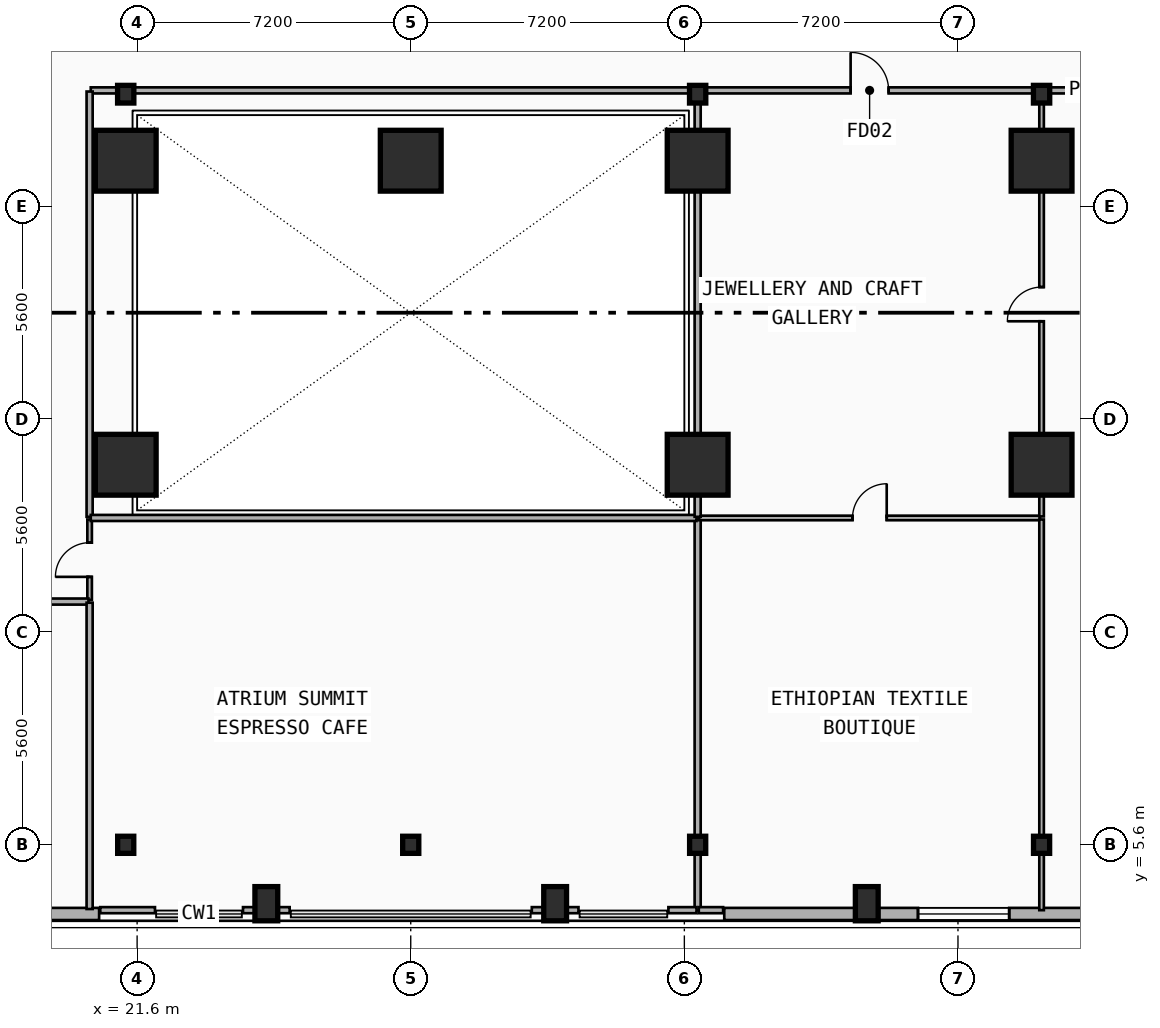
"""IFC4 building model, lengths in metres.
Left out: names, types, materials, properties, quantities, classifications, styles, units other than length and angle.
Written with IfcOpenShell. Run it as: python <this file> out.ifc"""

import sys

from ifc_helpers import new_model, si_unit, direction, frame, frame_2d, origin, origin_2d, place, context, subcontext, project, spatial, rectangle, i_section, extrude, element, fill, save


model = new_model("IFC4")
c1 = context("Model", 3, precision=1e-05, world=origin(), true_north=direction((0.0, 1.0)))
c2 = subcontext(c1, "Body", "Model", "MODEL_VIEW")
j1 = project(units=[si_unit("LENGTHUNIT", "METRE"), si_unit("PLANEANGLEUNIT", "RADIAN")], contexts=[c1])
p1 = place(None, origin())
s1 = spatial("IfcSite", under=j1, at=p1, CompositionType="ELEMENT")
p2 = place(p1, origin())
s2 = spatial("IfcBuilding", under=s1, at=p2, CompositionType="ELEMENT")
p3 = place(p2, frame((0.0, 0.0, 5.4)))
s3 = spatial("IfcBuildingStorey", under=s2, at=p3, CompositionType="ELEMENT", Elevation=5.4)
for number, where, z_axis, x_axis in (
    (1, (21.3, 25.35, 0.0), (0.0, 0.0, 1.0), (1.0, 0.0, 0.0)),
    (2, (36.35, 25.35, 0.0), (0.0, 0.0, 1.0), (1.0, 0.0, 0.0)),
    (3, (45.4, 25.35, 0.0), (0.0, 0.0, 1.0), (1.0, 0.0, 0.0)),
):
    element("IfcColumn", number, at=place(p3, frame(where, z_axis=z_axis, x_axis=x_axis)), inside=s3, PredefinedType="COLUMN", context=c2, shape_type="SweptSolid", body=[
        extrude(i_section(OverallWidth=0.428, OverallDepth=0.465, WebThickness=0.045, FlangeThickness=0.073, FilletRadius=0.015, at=origin_2d()), origin(), (0.0, 0.0, 1.0), 5.0),
    ])
p4 = place(p3, frame((21.3, 5.6, 0.0), z_axis=(0.0, 0.0, 1.0), x_axis=(1.0, 0.0, 0.0)))
e4 = element("IfcColumn", 4, at=p4, inside=s3, PredefinedType="COLUMN", context=c2, shape_type="SweptSolid", body=[
    extrude(i_section(OverallWidth=0.424, OverallDepth=0.45, WebThickness=0.041, FlangeThickness=0.065, FilletRadius=0.015, at=origin_2d()), origin(), (0.0, 0.0, 1.0), 5.0),
])
for number, where, z_axis, x_axis in (
    (5, (21.3, 15.6, 0.0), (0.0, 0.0, 1.0), (1.0, 0.0, 0.0)),
    (6, (21.3, 23.6, 0.0), (0.0, 0.0, 1.0), (1.0, 0.0, 0.0)),
):
    element("IfcColumn", number, at=place(p3, frame(where, z_axis=z_axis, x_axis=x_axis)), inside=s3, PredefinedType="COLUMN", context=c2, shape_type="SweptSolid", body=[
        extrude(rectangle(XDim=1.6, YDim=1.6, at=origin_2d()), origin(), (0.0, 0.0, 1.0), 5.0),
    ])
p5 = place(p3, frame((28.8, 5.6, 0.0), z_axis=(0.0, 0.0, 1.0), x_axis=(1.0, 0.0, 0.0)))
e7 = element("IfcColumn", 7, at=p5, inside=s3, PredefinedType="COLUMN", context=c2, shape_type="SweptSolid", body=[
    extrude(i_section(OverallWidth=0.424, OverallDepth=0.45, WebThickness=0.041, FlangeThickness=0.065, FilletRadius=0.015, at=origin_2d()), origin(), (0.0, 0.0, 1.0), 5.0),
])
p6 = place(p3, frame((28.8, 23.6, 0.0), z_axis=(0.0, 0.0, 1.0), x_axis=(1.0, 0.0, 0.0)))
e8 = element("IfcColumn", 8, at=p6, inside=s3, PredefinedType="COLUMN", context=c2, shape_type="SweptSolid", body=[
    extrude(rectangle(XDim=1.6, YDim=1.6, at=origin_2d()), origin(), (0.0, 0.0, 1.0), 5.0),
])
p7 = place(p3, frame((36.35, 5.6, 0.0), z_axis=(0.0, 0.0, 1.0), x_axis=(1.0, 0.0, 0.0)))
e9 = element("IfcColumn", 9, at=p7, inside=s3, PredefinedType="COLUMN", context=c2, shape_type="SweptSolid", body=[
    extrude(i_section(OverallWidth=0.424, OverallDepth=0.45, WebThickness=0.041, FlangeThickness=0.065, FilletRadius=0.015, at=origin_2d()), origin(), (0.0, 0.0, 1.0), 5.0),
])
for number, where, z_axis, x_axis in (
    (10, (36.35, 15.6, 0.0), (0.0, 0.0, 1.0), (1.0, 0.0, 0.0)),
    (11, (36.35, 23.6, 0.0), (0.0, 0.0, 1.0), (1.0, 0.0, 0.0)),
):
    element("IfcColumn", number, at=place(p3, frame(where, z_axis=z_axis, x_axis=x_axis)), inside=s3, PredefinedType="COLUMN", context=c2, shape_type="SweptSolid", body=[
        extrude(rectangle(XDim=1.6, YDim=1.6, at=origin_2d()), origin(), (0.0, 0.0, 1.0), 5.0),
    ])
p8 = place(p3, frame((45.4, 5.6, 0.0), z_axis=(0.0, 0.0, 1.0), x_axis=(1.0, 0.0, 0.0)))
e12 = element("IfcColumn", 12, at=p8, inside=s3, PredefinedType="COLUMN", context=c2, shape_type="SweptSolid", body=[
    extrude(i_section(OverallWidth=0.424, OverallDepth=0.45, WebThickness=0.041, FlangeThickness=0.065, FilletRadius=0.015, at=origin_2d()), origin(), (0.0, 0.0, 1.0), 5.0),
])
for number, where, z_axis, x_axis in (
    (13, (45.4, 15.6, 0.0), (0.0, 0.0, 1.0), (1.0, 0.0, 0.0)),
    (14, (45.4, 23.6, 0.0), (0.0, 0.0, 1.0), (1.0, 0.0, 0.0)),
):
    element("IfcColumn", number, at=place(p3, frame(where, z_axis=z_axis, x_axis=x_axis)), inside=s3, PredefinedType="COLUMN", context=c2, shape_type="SweptSolid", body=[
        extrude(rectangle(XDim=1.6, YDim=1.6, at=origin_2d()), origin(), (0.0, 0.0, 1.0), 5.0),
    ])
for number, where, z_axis, x_axis in (
    (15, (25.0, 4.05, 0.0), (0.0, 0.0, 1.0), (1.0, 0.0, 0.0)),
    (16, (32.6, 4.05, 0.0), (0.0, 0.0, 1.0), (1.0, 0.0, 0.0)),
    (17, (40.8, 4.05, 0.0), (0.0, 0.0, 1.0), (1.0, 0.0, 0.0)),
):
    element("IfcColumn", number, at=place(p3, frame(where, z_axis=z_axis, x_axis=x_axis)), inside=s3, PredefinedType="PILASTER", context=c2, shape_type="SweptSolid", body=[
        extrude(rectangle(XDim=0.6, YDim=0.9, at=origin_2d()), origin(), (0.0, 0.0, 1.0), 5.0),
    ])
p9 = place(p3, frame((20.6, 3.78, 0.0), z_axis=(0.0, 0.0, 1.0), x_axis=(-1.0, 0.0, 0.0)))
e18 = element("IfcWall", 18, at=p9, inside=s3, PredefinedType="SOLIDWALL", context=c2, shape_type="SweptSolid", body=[
    extrude(rectangle(XDim=17.0, YDim=0.32, at=frame_2d((8.5, 0.0))), origin(), (0.0, 0.0, 1.0), 4.03),
])
p10 = place(p9, frame((6.5, 0.0, 0.9)))
e19 = element("IfcOpeningElement", 19, at=p10, cuts=e18, PredefinedType="OPENING", context=c2, shape_type="SweptSolid", body=[
    extrude(rectangle(XDim=2.4, YDim=1.8, at=frame_2d((1.2, 0.9))), frame((0.0, 0.17, 0.0), z_axis=(0.0, -1.0, 0.0), x_axis=(1.0, 0.0, 0.0)), (0.0, 0.0, 1.0), 0.34),
])
p11 = place(p3, frame((54.0, 3.78, 0.0), z_axis=(0.0, 0.0, 1.0), x_axis=(-1.0, 0.0, 0.0)))
e20 = element("IfcWall", 20, at=p11, inside=s3, PredefinedType="SOLIDWALL", context=c2, shape_type="SweptSolid", body=[
    extrude(rectangle(XDim=16.95, YDim=0.32, at=frame_2d((8.475, 0.0))), origin(), (0.0, 0.0, 1.0), 4.03),
])
p12 = place(p11, frame((9.452, 0.0, 0.9)))
e21 = element("IfcOpeningElement", 21, at=p12, cuts=e20, PredefinedType="OPENING", context=c2, shape_type="SweptSolid", body=[
    extrude(rectangle(XDim=2.4, YDim=1.8, at=frame_2d((1.2, 0.9))), frame((0.0, 0.17, 0.0), z_axis=(0.0, -1.0, 0.0), x_axis=(1.0, 0.0, 0.0)), (0.0, 0.0, 1.0), 0.34),
])
p13 = place(p11, frame((1.262, 0.0, 0.9)))
e22 = element("IfcOpeningElement", 22, at=p13, cuts=e20, PredefinedType="OPENING", context=c2, shape_type="SweptSolid", body=[
    extrude(rectangle(XDim=2.4, YDim=1.8, at=frame_2d((1.2, 0.9))), frame((0.0, 0.17, 0.0), z_axis=(0.0, -1.0, 0.0), x_axis=(1.0, 0.0, 0.0)), (0.0, 0.0, 1.0), 0.34),
])
p14 = place(p3, frame((36.39, 25.45, 0.0), z_axis=(0.0, 0.0, 1.0), x_axis=(1.0, 0.0, 0.0)))
e23 = element("IfcWall", 23, at=p14, inside=s3, PredefinedType="PARTITIONING", context=c2, shape_type="SweptSolid", body=[
    extrude(rectangle(XDim=8.97, YDim=0.16, at=frame_2d((4.485, 0.0))), origin(), (0.0, 0.0, 1.0), 3.672),
])
p15 = place(p14, frame((3.985, 0.0, 0.0)))
e24 = element("IfcOpeningElement", 24, at=p15, cuts=e23, PredefinedType="OPENING", context=c2, shape_type="SweptSolid", body=[
    extrude(rectangle(XDim=1.0, YDim=2.15, at=frame_2d((0.5, 1.075))), frame((0.0, 0.09, 0.0), z_axis=(0.0, -1.0, 0.0), x_axis=(1.0, 0.0, 0.0)), (0.0, 0.0, 1.0), 0.18),
])
p16 = place(p3, frame((45.44, 25.45, 0.0), z_axis=(0.0, 0.0, 1.0), x_axis=(1.0, 0.0, 0.0)))
e25 = element("IfcWall", 25, at=p16, inside=s3, PredefinedType="PARTITIONING", context=c2, shape_type="SweptSolid", body=[
    extrude(rectangle(XDim=2.57, YDim=0.16, at=frame_2d((1.285, 0.0))), origin(), (0.0, 0.0, 1.0), 3.672),
])
p17 = place(p3, frame((20.35, 12.04, 0.0), z_axis=(0.0, 0.0, 1.0), x_axis=(0.0, 1.0, 0.0)))
e26 = element("IfcWall", 26, at=p17, inside=s3, PredefinedType="PARTITIONING", context=c2, shape_type="SweptSolid", body=[
    extrude(rectangle(XDim=2.12, YDim=0.12, at=frame_2d((1.06, 0.0))), origin(), (0.0, 0.0, 1.0), 4.32),
])
p18 = place(p17, frame((0.61, 0.0, 0.0)))
e27 = element("IfcOpeningElement", 27, at=p18, cuts=e26, PredefinedType="OPENING", context=c2, shape_type="SweptSolid", body=[
    extrude(rectangle(XDim=0.9, YDim=2.1, at=frame_2d((0.45, 1.05))), frame((0.0, 0.07, 0.0), z_axis=(0.0, -1.0, 0.0), x_axis=(1.0, 0.0, 0.0)), (0.0, 0.0, 1.0), 0.14),
])
p19 = place(p3, frame((36.35, 3.88, 0.0), z_axis=(0.0, 0.0, 1.0), x_axis=(0.0, 1.0, 0.0)))
e28 = element("IfcWall", 28, at=p19, inside=s3, PredefinedType="PARTITIONING", context=c2, shape_type="SweptSolid", body=[
    extrude(rectangle(XDim=10.28, YDim=0.16, at=frame_2d((5.14, 0.0))), origin(), (0.0, 0.0, 1.0), 3.672),
])
p20 = place(p3, frame((36.39, 14.2, 0.0), z_axis=(0.0, 0.0, 1.0), x_axis=(1.0, 0.0, 0.0)))
e29 = element("IfcWall", 29, at=p20, inside=s3, PredefinedType="PARTITIONING", context=c2, shape_type="SweptSolid", body=[
    extrude(rectangle(XDim=8.97, YDim=0.12, at=frame_2d((4.485, 0.0))), origin(), (0.0, 0.0, 1.0), 3.672),
])
p21 = place(p20, frame((4.035, 0.0, 0.0)))
e30 = element("IfcOpeningElement", 30, at=p21, cuts=e29, PredefinedType="OPENING", context=c2, shape_type="SweptSolid", body=[
    extrude(rectangle(XDim=0.9, YDim=2.1, at=frame_2d((0.45, 1.05))), frame((0.0, 0.07, 0.0), z_axis=(0.0, -1.0, 0.0), x_axis=(1.0, 0.0, 0.0)), (0.0, 0.0, 1.0), 0.14),
])
p22 = place(p3, frame((45.4, 3.88, 0.0), z_axis=(0.0, 0.0, 1.0), x_axis=(0.0, 1.0, 0.0)))
e31 = element("IfcWall", 31, at=p22, inside=s3, PredefinedType="PARTITIONING", context=c2, shape_type="SweptSolid", body=[
    extrude(rectangle(XDim=10.28, YDim=0.12, at=frame_2d((5.14, 0.0))), origin(), (0.0, 0.0, 1.0), 3.672),
])
p23 = place(p3, frame((45.4, 14.24, 0.0), z_axis=(0.0, 0.0, 1.0), x_axis=(0.0, 1.0, 0.0)))
e32 = element("IfcWall", 32, at=p23, inside=s3, PredefinedType="PARTITIONING", context=c2, shape_type="SweptSolid", body=[
    extrude(rectangle(XDim=11.17, YDim=0.12, at=frame_2d((5.585, 0.0))), origin(), (0.0, 0.0, 1.0), 3.672),
])
p24 = place(p23, frame((5.135, 0.0, 0.0)))
e33 = element("IfcOpeningElement", 33, at=p24, cuts=e32, PredefinedType="OPENING", context=c2, shape_type="SweptSolid", body=[
    extrude(rectangle(XDim=0.9, YDim=2.1, at=frame_2d((0.45, 1.05))), frame((0.0, 0.07, 0.0), z_axis=(0.0, -1.0, 0.0), x_axis=(1.0, 0.0, 0.0)), (0.0, 0.0, 1.0), 0.14),
])
p25 = place(p3, frame((20.38, 25.45, 0.0), z_axis=(0.0, 0.0, 1.0), x_axis=(1.0, 0.0, 0.0)))
e34 = element("IfcWall", 34, at=p25, inside=s3, PredefinedType="PARTITIONING", context=c2, shape_type="SweptSolid", body=[
    extrude(rectangle(XDim=15.94, YDim=0.16, at=frame_2d((7.97, 0.0))), origin(), (0.0, 0.0, 1.0), 3.672),
])
p26 = place(p3, frame((18.83, 12.0, 0.0), z_axis=(0.0, 0.0, 1.0), x_axis=(1.0, 0.0, 0.0)))
e35 = element("IfcWall", 35, at=p26, inside=s3, PredefinedType="PARTITIONING", context=c2, shape_type="SweptSolid", body=[
    extrude(rectangle(XDim=1.49, YDim=0.16, at=frame_2d((0.745, 0.0))), origin(), (0.0, 0.0, 1.0), 4.32),
])
p27 = place(p3, frame((20.35, 14.23, 0.0), z_axis=(0.0, 0.0, 1.0), x_axis=(0.0, 1.0, 0.0)))
e36 = element("IfcWall", 36, at=p27, inside=s3, PredefinedType="PARTITIONING", context=c2, shape_type="SweptSolid", body=[
    extrude(rectangle(XDim=11.19, YDim=0.16, at=frame_2d((5.595, 0.0))), origin(), (0.0, 0.0, 1.0), 3.672),
])
p28 = place(p3, frame((20.63, 3.88, 0.0), z_axis=(0.0, 0.0, 1.0), x_axis=(1.0, 0.0, 0.0)))
e37 = element("IfcWall", 37, at=p28, inside=s3, PredefinedType="PARTITIONING", context=c2, shape_type="SweptSolid", body=[
    extrude(rectangle(XDim=1.44, YDim=0.16, at=frame_2d((0.72, 0.0))), origin(), (0.0, 0.0, 1.0), 4.03),
])
for number, where, z_axis, x_axis in (
    (38, (24.386, 3.88, 0.0), (0.0, 0.0, 1.0), (1.0, 0.0, 0.0)),
    (39, (31.986, 3.88, 0.0), (0.0, 0.0, 1.0), (1.0, 0.0, 0.0)),
):
    element("IfcWall", number, at=place(p3, frame(where, z_axis=z_axis, x_axis=x_axis)), inside=s3, PredefinedType="PARTITIONING", context=c2, shape_type="SweptSolid", body=[
        extrude(rectangle(XDim=1.228, YDim=0.16, at=frame_2d((0.614, 0.0))), origin(), (0.0, 0.0, 1.0), 4.03),
    ])
p29 = place(p3, frame((35.58, 3.88, 0.0), z_axis=(0.0, 0.0, 1.0), x_axis=(1.0, 0.0, 0.0)))
e40 = element("IfcWall", 40, at=p29, inside=s3, PredefinedType="PARTITIONING", context=c2, shape_type="SweptSolid", body=[
    extrude(rectangle(XDim=0.74, YDim=0.16, at=frame_2d((0.37, 0.0))), origin(), (0.0, 0.0, 1.0), 4.03),
])
p30 = place(p3, frame((20.38, 14.2, 0.0), z_axis=(0.0, 0.0, 1.0), x_axis=(1.0, 0.0, 0.0)))
e41 = element("IfcWall", 41, at=p30, inside=s3, PredefinedType="PARTITIONING", context=c2, shape_type="SweptSolid", body=[
    extrude(rectangle(XDim=15.94, YDim=0.16, at=frame_2d((7.97, 0.0))), origin(), (0.0, 0.0, 1.0), 3.672),
])
p31 = place(p3, frame((20.35, 3.91, 0.0), z_axis=(0.0, 0.0, 1.0), x_axis=(0.0, 1.0, 0.0)))
e42 = element("IfcWall", 42, at=p31, inside=s3, PredefinedType="PARTITIONING", context=c2, shape_type="SweptSolid", body=[
    extrude(rectangle(XDim=8.06, YDim=0.16, at=frame_2d((4.03, 0.0))), origin(), (0.0, 0.0, 1.0), 4.03),
])
p32 = place(p3, frame((36.38, 3.88, 0.0), z_axis=(0.0, 0.0, 1.0), x_axis=(1.0, 0.0, 0.0)))
e43 = element("IfcWall", 43, at=p32, inside=s3, PredefinedType="PARTITIONING", context=c2, shape_type="SweptSolid", body=[
    extrude(rectangle(XDim=0.64, YDim=0.16, at=frame_2d((0.32, 0.0))), origin(), (0.0, 0.0, 1.0), 4.03),
])
p33 = place(p3, frame((36.35, 14.23, 0.0), z_axis=(0.0, 0.0, 1.0), x_axis=(0.0, 1.0, 0.0)))
e44 = element("IfcWall", 44, at=p33, inside=s3, PredefinedType="PARTITIONING", context=c2, shape_type="SweptSolid", body=[
    extrude(rectangle(XDim=11.19, YDim=0.16, at=frame_2d((5.595, 0.0))), origin(), (0.0, 0.0, 1.0), 3.672),
])
p34 = place(p12, origin())
e45 = element("IfcWindow", 45, at=p34, inside=s3, PartitioningType="SINGLE_PANEL", PredefinedType="WINDOW", context=c2, shape_type="SweptSolid", body=[
    extrude(rectangle(XDim=2.4, YDim=1.8, at=frame_2d((1.2, 0.9))), frame((0.0, 0.03, 0.0), z_axis=(0.0, -1.0, 0.0), x_axis=(1.0, 0.0, 0.0)), (0.0, 0.0, 1.0), 0.06),
])
fill(e21, e45)
p35 = place(p15, origin())
e46 = element("IfcDoor", 46, at=p35, inside=s3, OperationType="SINGLE_SWING_LEFT", PredefinedType="DOOR", context=c2, shape_type="SweptSolid", body=[
    extrude(rectangle(XDim=1.0, YDim=2.15, at=frame_2d((0.5, 1.075))), frame((0.0, 0.025, 0.0), z_axis=(0.0, -1.0, 0.0), x_axis=(1.0, 0.0, 0.0)), (0.0, 0.0, 1.0), 0.05),
])
fill(e24, e46)
p36 = place(p18, origin())
e47 = element("IfcDoor", 47, at=p36, inside=s3, OperationType="SINGLE_SWING_LEFT", PredefinedType="DOOR", context=c2, shape_type="SweptSolid", body=[
    extrude(rectangle(XDim=0.9, YDim=2.1, at=frame_2d((0.45, 1.05))), frame((0.0, 0.025, 0.0), z_axis=(0.0, -1.0, 0.0), x_axis=(1.0, 0.0, 0.0)), (0.0, 0.0, 1.0), 0.05),
])
fill(e27, e47)
p37 = place(p21, origin())
e48 = element("IfcDoor", 48, at=p37, inside=s3, OperationType="SINGLE_SWING_RIGHT", PredefinedType="DOOR", context=c2, shape_type="SweptSolid", body=[
    extrude(rectangle(XDim=0.9, YDim=2.1, at=frame_2d((0.45, 1.05))), frame((0.0, 0.025, 0.0), z_axis=(0.0, -1.0, 0.0), x_axis=(1.0, 0.0, 0.0)), (0.0, 0.0, 1.0), 0.05),
])
fill(e30, e48)
p38 = place(p24, origin())
e49 = element("IfcDoor", 49, at=p38, inside=s3, OperationType="SINGLE_SWING_LEFT", PredefinedType="DOOR", context=c2, shape_type="SweptSolid", body=[
    extrude(rectangle(XDim=0.9, YDim=2.1, at=frame_2d((0.45, 1.05))), frame((0.0, 0.025, 0.0), z_axis=(0.0, -1.0, 0.0), x_axis=(1.0, 0.0, 0.0)), (0.0, 0.0, 1.0), 0.05),
])
fill(e33, e49)
save(model, sys.argv[1])
